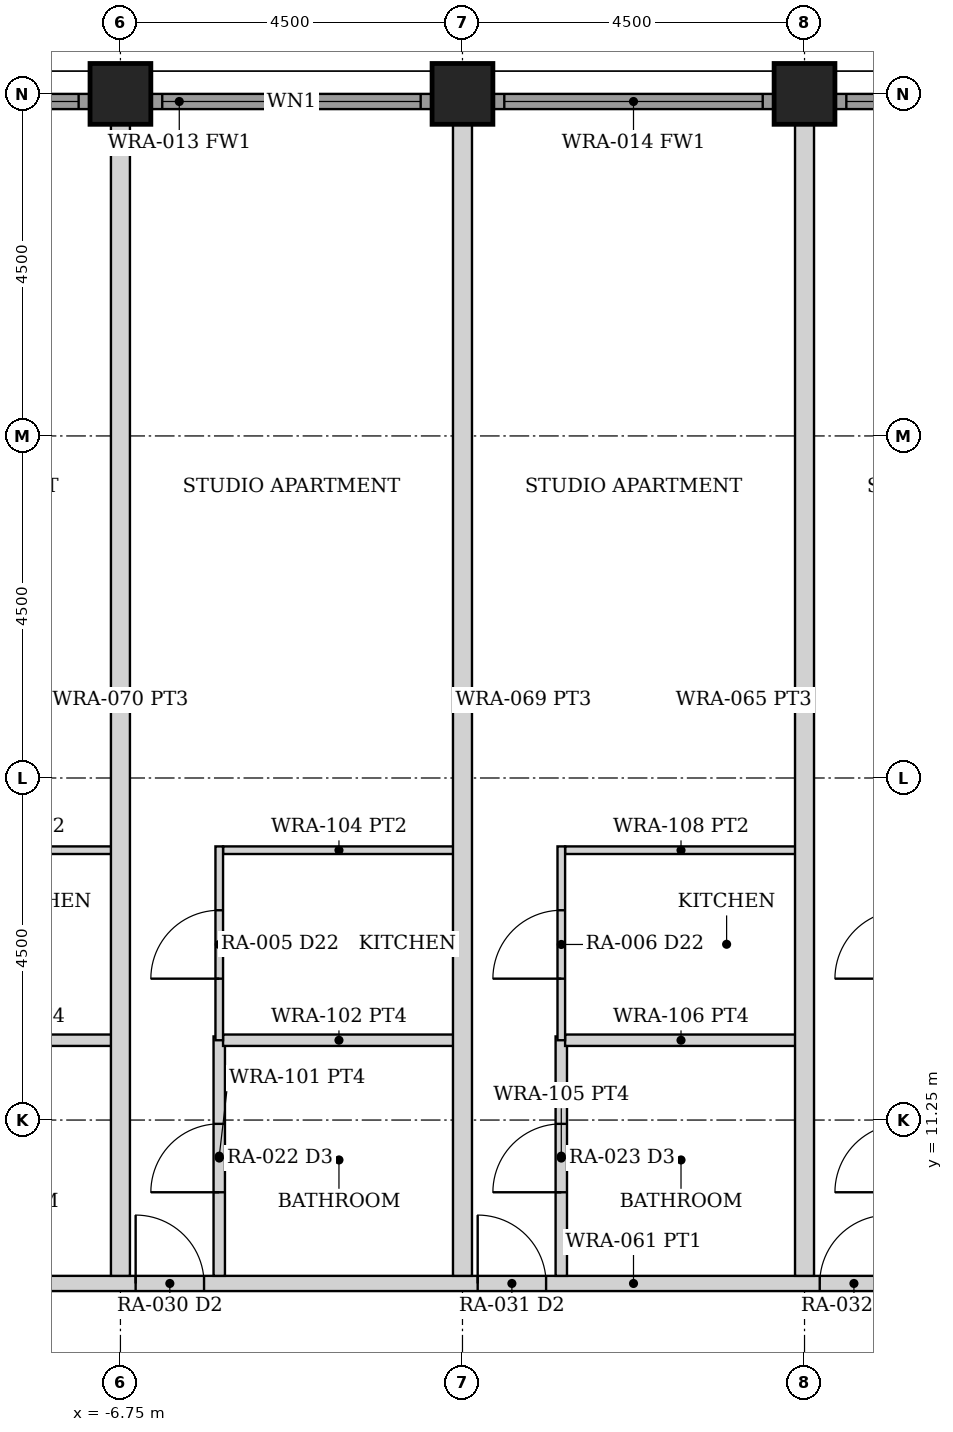
"""IFC4 building model, lengths in metres.
Left out: names, types, materials, properties, quantities, classifications, styles, units other than length and angle.
Written with IfcOpenShell. Run it as: python <this file> out.ifc"""

import sys

from ifc_helpers import new_model, si_unit, direction, frame, frame_2d, origin, origin_2d, place, context, subcontext, project, spatial, rectangle, hollow_rectangle, extrude, element, fill, save


model = new_model("IFC4")
c1 = context("Model", 3, precision=1e-05, world=origin(), true_north=direction((0.0, 1.0)))
c2 = subcontext(c1, "Body", "Model", "MODEL_VIEW")
j1 = project(units=[si_unit("LENGTHUNIT", "METRE"), si_unit("PLANEANGLEUNIT", "RADIAN")], contexts=[c1])
p1 = place(None, origin())
s1 = spatial("IfcSite", under=j1, at=p1, CompositionType="ELEMENT")
p2 = place(p1, origin())
s2 = spatial("IfcBuilding", under=s1, at=p2, CompositionType="ELEMENT")
p3 = place(p2, frame((0.0, 0.0, 26.5)))
s3 = spatial("IfcBuildingStorey", under=s2, at=p3, CompositionType="ELEMENT", Elevation=26.5)
for number, where, z_axis, x_axis in (
    (1, (-6.75, 24.75, 0.0), (0.0, 0.0, 1.0), (0.0, 1.0, 0.0)),
    (2, (-2.25, 24.75, 0.0), (0.0, 0.0, 1.0), (0.0, 1.0, 0.0)),
    (3, (2.25, 24.75, 0.0), (0.0, 0.0, 1.0), (0.0, 1.0, 0.0)),
):
    element("IfcColumn", number, at=place(p3, frame(where, z_axis=z_axis, x_axis=x_axis)), inside=s3, PredefinedType="COLUMN", context=c2, shape_type="SweptSolid", body=[
        extrude(hollow_rectangle(XDim=0.8, YDim=0.8, WallThickness=0.08, at=origin_2d()), origin(), (0.0, 0.0, 1.0), 3.5),
    ])
p4 = place(p3, frame((-10.845, 24.65, 0.0), z_axis=(0.0, 0.0, 1.0), x_axis=(1.0, 0.0, 0.0)))
e4 = element("IfcWall", 4, at=p4, inside=s3, PredefinedType="SOLIDWALL", context=c2, shape_type="SweptSolid", body=[
    extrude(rectangle(XDim=3.69, YDim=0.2, at=frame_2d((1.845, 0.0))), origin(), (0.0, 0.0, 1.0), 2.379),
])
p5 = place(p4, frame((0.145, 0.0, 0.3)))
e5 = element("IfcOpeningElement", 5, at=p5, cuts=e4, PredefinedType="OPENING", context=c2, shape_type="SweptSolid", body=[
    extrude(rectangle(XDim=3.4, YDim=1.929, at=frame_2d((1.7, 0.964))), frame((0.0, 0.11, 0.0), z_axis=(0.0, -1.0, 0.0), x_axis=(1.0, 0.0, 0.0)), (0.0, 0.0, 1.0), 0.22),
])
p6 = place(p3, frame((-6.345, 24.65, 0.0), z_axis=(0.0, 0.0, 1.0), x_axis=(1.0, 0.0, 0.0)))
e6 = element("IfcWall", 6, at=p6, inside=s3, PredefinedType="SOLIDWALL", context=c2, shape_type="SweptSolid", body=[
    extrude(rectangle(XDim=3.69, YDim=0.2, at=frame_2d((1.845, 0.0))), origin(), (0.0, 0.0, 1.0), 2.379),
])
p7 = place(p6, frame((0.145, 0.0, 0.3)))
e7 = element("IfcOpeningElement", 7, at=p7, cuts=e6, PredefinedType="OPENING", context=c2, shape_type="SweptSolid", body=[
    extrude(rectangle(XDim=3.4, YDim=1.929, at=frame_2d((1.7, 0.964))), frame((0.0, 0.11, 0.0), z_axis=(0.0, -1.0, 0.0), x_axis=(1.0, 0.0, 0.0)), (0.0, 0.0, 1.0), 0.22),
])
p8 = place(p3, frame((-1.845, 24.65, 0.0), z_axis=(0.0, 0.0, 1.0), x_axis=(1.0, 0.0, 0.0)))
e8 = element("IfcWall", 8, at=p8, inside=s3, PredefinedType="SOLIDWALL", context=c2, shape_type="SweptSolid", body=[
    extrude(rectangle(XDim=3.69, YDim=0.2, at=frame_2d((1.845, 0.0))), origin(), (0.0, 0.0, 1.0), 2.379),
])
p9 = place(p8, frame((0.145, 0.0, 0.3)))
e9 = element("IfcOpeningElement", 9, at=p9, cuts=e8, PredefinedType="OPENING", context=c2, shape_type="SweptSolid", body=[
    extrude(rectangle(XDim=3.4, YDim=1.929, at=frame_2d((1.7, 0.964))), frame((0.0, 0.11, 0.0), z_axis=(0.0, -1.0, 0.0), x_axis=(1.0, 0.0, 0.0)), (0.0, 0.0, 1.0), 0.22),
])
p10 = place(p3, frame((2.655, 24.65, 0.0), z_axis=(0.0, 0.0, 1.0), x_axis=(1.0, 0.0, 0.0)))
e10 = element("IfcWall", 10, at=p10, inside=s3, PredefinedType="SOLIDWALL", context=c2, shape_type="SweptSolid", body=[
    extrude(rectangle(XDim=3.69, YDim=0.2, at=frame_2d((1.845, 0.0))), origin(), (0.0, 0.0, 1.0), 2.379),
])
p11 = place(p10, frame((0.145, 0.0, 0.3)))
e11 = element("IfcOpeningElement", 11, at=p11, cuts=e10, PredefinedType="OPENING", context=c2, shape_type="SweptSolid", body=[
    extrude(rectangle(XDim=3.4, YDim=1.929, at=frame_2d((1.7, 0.964))), frame((0.0, 0.11, 0.0), z_axis=(0.0, -1.0, 0.0), x_axis=(1.0, 0.0, 0.0)), (0.0, 0.0, 1.0), 0.22),
])
p12 = place(p3, frame((-24.55, 9.1, 0.0), z_axis=(0.0, 0.0, 1.0), x_axis=(1.0, 0.0, 0.0)))
e12 = element("IfcWall", 12, at=p12, inside=s3, PredefinedType="PARTITIONING", context=c2, shape_type="SweptSolid", body=[
    extrude(rectangle(XDim=49.1, YDim=0.2, at=frame_2d((24.55, 0.0))), origin(), (0.0, 0.0, 1.0), 2.373),
])
p13 = place(p12, frame((5.1, 0.0, 0.0)))
e13 = element("IfcOpeningElement", 13, at=p13, cuts=e12, PredefinedType="OPENING", context=c2, shape_type="SweptSolid", body=[
    extrude(rectangle(XDim=0.9, YDim=2.1, at=frame_2d((0.45, 1.05))), frame((0.0, 0.11, 0.0), z_axis=(0.0, -1.0, 0.0), x_axis=(1.0, 0.0, 0.0)), (0.0, 0.0, 1.0), 0.22),
])
p14 = place(p12, frame((9.0, 0.0, 0.0)))
e14 = element("IfcOpeningElement", 14, at=p14, cuts=e12, PredefinedType="OPENING", context=c2, shape_type="SweptSolid", body=[
    extrude(rectangle(XDim=0.9, YDim=2.1, at=frame_2d((0.45, 1.05))), frame((0.0, 0.11, 0.0), z_axis=(0.0, -1.0, 0.0), x_axis=(1.0, 0.0, 0.0)), (0.0, 0.0, 1.0), 0.22),
])
p15 = place(p12, frame((13.5, 0.0, 0.0)))
e15 = element("IfcOpeningElement", 15, at=p15, cuts=e12, PredefinedType="OPENING", context=c2, shape_type="SweptSolid", body=[
    extrude(rectangle(XDim=0.9, YDim=2.1, at=frame_2d((0.45, 1.05))), frame((0.0, 0.11, 0.0), z_axis=(0.0, -1.0, 0.0), x_axis=(1.0, 0.0, 0.0)), (0.0, 0.0, 1.0), 0.22),
])
p16 = place(p12, frame((18.0, 0.0, 0.0)))
e16 = element("IfcOpeningElement", 16, at=p16, cuts=e12, PredefinedType="OPENING", context=c2, shape_type="SweptSolid", body=[
    extrude(rectangle(XDim=0.9, YDim=2.1, at=frame_2d((0.45, 1.05))), frame((0.0, 0.11, 0.0), z_axis=(0.0, -1.0, 0.0), x_axis=(1.0, 0.0, 0.0)), (0.0, 0.0, 1.0), 0.22),
])
p17 = place(p12, frame((22.5, 0.0, 0.0)))
e17 = element("IfcOpeningElement", 17, at=p17, cuts=e12, PredefinedType="OPENING", context=c2, shape_type="SweptSolid", body=[
    extrude(rectangle(XDim=0.9, YDim=2.1, at=frame_2d((0.45, 1.05))), frame((0.0, 0.11, 0.0), z_axis=(0.0, -1.0, 0.0), x_axis=(1.0, 0.0, 0.0)), (0.0, 0.0, 1.0), 0.22),
])
p18 = place(p12, frame((27.0, 0.0, 0.0)))
e18 = element("IfcOpeningElement", 18, at=p18, cuts=e12, PredefinedType="OPENING", context=c2, shape_type="SweptSolid", body=[
    extrude(rectangle(XDim=0.9, YDim=2.1, at=frame_2d((0.45, 1.05))), frame((0.0, 0.11, 0.0), z_axis=(0.0, -1.0, 0.0), x_axis=(1.0, 0.0, 0.0)), (0.0, 0.0, 1.0), 0.22),
])
p19 = place(p12, frame((31.5, 0.0, 0.0)))
e19 = element("IfcOpeningElement", 19, at=p19, cuts=e12, PredefinedType="OPENING", context=c2, shape_type="SweptSolid", body=[
    extrude(rectangle(XDim=0.9, YDim=2.1, at=frame_2d((0.45, 1.05))), frame((0.0, 0.11, 0.0), z_axis=(0.0, -1.0, 0.0), x_axis=(1.0, 0.0, 0.0)), (0.0, 0.0, 1.0), 0.22),
])
p20 = place(p12, frame((36.0, 0.0, 0.0)))
e20 = element("IfcOpeningElement", 20, at=p20, cuts=e12, PredefinedType="OPENING", context=c2, shape_type="SweptSolid", body=[
    extrude(rectangle(XDim=0.9, YDim=2.1, at=frame_2d((0.45, 1.05))), frame((0.0, 0.11, 0.0), z_axis=(0.0, -1.0, 0.0), x_axis=(1.0, 0.0, 0.0)), (0.0, 0.0, 1.0), 0.22),
])
p21 = place(p12, frame((43.1, 0.0, 0.0)))
e21 = element("IfcOpeningElement", 21, at=p21, cuts=e12, PredefinedType="OPENING", context=c2, shape_type="SweptSolid", body=[
    extrude(rectangle(XDim=0.9, YDim=2.1, at=frame_2d((0.45, 1.05))), frame((0.0, 0.11, 0.0), z_axis=(0.0, -1.0, 0.0), x_axis=(1.0, 0.0, 0.0)), (0.0, 0.0, 1.0), 0.22),
])
p22 = place(p3, frame((-9.9, 12.3, 0.0), z_axis=(0.0, 0.0, 1.0), x_axis=(1.0, 0.0, 0.0)))
e22 = element("IfcWall", 22, at=p22, inside=s3, PredefinedType="PARTITIONING", context=c2, shape_type="SweptSolid", body=[
    extrude(rectangle(XDim=3.05, YDim=0.15, at=frame_2d((1.525, 0.0))), origin(), (0.0, 0.0, 1.0), 2.373),
])
p23 = place(p3, frame((-9.9, 14.8, 0.0), z_axis=(0.0, 0.0, 1.0), x_axis=(1.0, 0.0, 0.0)))
e23 = element("IfcWall", 23, at=p23, inside=s3, PredefinedType="PARTITIONING", context=c2, shape_type="SweptSolid", body=[
    extrude(rectangle(XDim=3.05, YDim=0.1, at=frame_2d((1.525, 0.0))), origin(), (0.0, 0.0, 1.0), 2.373),
])
p24 = place(p3, frame((-5.45, 9.2, 0.0), z_axis=(0.0, 0.0, 1.0), x_axis=(0.0, 1.0, 0.0)))
e24 = element("IfcWall", 24, at=p24, inside=s3, PredefinedType="PARTITIONING", context=c2, shape_type="SweptSolid", body=[
    extrude(rectangle(XDim=3.15, YDim=0.15, at=frame_2d((1.575, 0.0))), origin(), (0.0, 0.0, 1.0), 2.373),
])
p25 = place(p24, frame((1.1, 0.0, 0.0)))
e25 = element("IfcOpeningElement", 25, at=p25, cuts=e24, PredefinedType="OPENING", context=c2, shape_type="SweptSolid", body=[
    extrude(rectangle(XDim=0.9, YDim=2.1, at=frame_2d((0.45, 1.05))), frame((0.0, 0.085, 0.0), z_axis=(0.0, -1.0, 0.0), x_axis=(1.0, 0.0, 0.0)), (0.0, 0.0, 1.0), 0.17),
])
p26 = place(p3, frame((-5.4, 12.3, 0.0), z_axis=(0.0, 0.0, 1.0), x_axis=(1.0, 0.0, 0.0)))
e26 = element("IfcWall", 26, at=p26, inside=s3, PredefinedType="PARTITIONING", context=c2, shape_type="SweptSolid", body=[
    extrude(rectangle(XDim=3.05, YDim=0.15, at=frame_2d((1.525, 0.0))), origin(), (0.0, 0.0, 1.0), 2.373),
])
p27 = place(p3, frame((-5.4, 14.8, 0.0), z_axis=(0.0, 0.0, 1.0), x_axis=(1.0, 0.0, 0.0)))
e27 = element("IfcWall", 27, at=p27, inside=s3, PredefinedType="PARTITIONING", context=c2, shape_type="SweptSolid", body=[
    extrude(rectangle(XDim=3.05, YDim=0.1, at=frame_2d((1.525, 0.0))), origin(), (0.0, 0.0, 1.0), 2.373),
])
p28 = place(p3, frame((-5.45, 12.3, 0.0), z_axis=(0.0, 0.0, 1.0), x_axis=(0.0, 1.0, 0.0)))
e28 = element("IfcWall", 28, at=p28, inside=s3, PredefinedType="PARTITIONING", context=c2, shape_type="SweptSolid", body=[
    extrude(rectangle(XDim=2.55, YDim=0.1, at=frame_2d((1.275, 0.0))), origin(), (0.0, 0.0, 1.0), 2.373),
])
p29 = place(p28, frame((0.81, 0.0, 0.0)))
e29 = element("IfcOpeningElement", 29, at=p29, cuts=e28, PredefinedType="OPENING", context=c2, shape_type="SweptSolid", body=[
    extrude(rectangle(XDim=0.9, YDim=2.1, at=frame_2d((0.45, 1.05))), frame((0.0, 0.06, 0.0), z_axis=(0.0, -1.0, 0.0), x_axis=(1.0, 0.0, 0.0)), (0.0, 0.0, 1.0), 0.12),
])
p30 = place(p3, frame((-0.95, 9.2, 0.0), z_axis=(0.0, 0.0, 1.0), x_axis=(0.0, 1.0, 0.0)))
e30 = element("IfcWall", 30, at=p30, inside=s3, PredefinedType="PARTITIONING", context=c2, shape_type="SweptSolid", body=[
    extrude(rectangle(XDim=3.15, YDim=0.15, at=frame_2d((1.575, 0.0))), origin(), (0.0, 0.0, 1.0), 2.373),
])
p31 = place(p30, frame((1.1, 0.0, 0.0)))
e31 = element("IfcOpeningElement", 31, at=p31, cuts=e30, PredefinedType="OPENING", context=c2, shape_type="SweptSolid", body=[
    extrude(rectangle(XDim=0.9, YDim=2.1, at=frame_2d((0.45, 1.05))), frame((0.0, 0.085, 0.0), z_axis=(0.0, -1.0, 0.0), x_axis=(1.0, 0.0, 0.0)), (0.0, 0.0, 1.0), 0.17),
])
p32 = place(p3, frame((-0.9, 12.3, 0.0), z_axis=(0.0, 0.0, 1.0), x_axis=(1.0, 0.0, 0.0)))
e32 = element("IfcWall", 32, at=p32, inside=s3, PredefinedType="PARTITIONING", context=c2, shape_type="SweptSolid", body=[
    extrude(rectangle(XDim=3.05, YDim=0.15, at=frame_2d((1.525, 0.0))), origin(), (0.0, 0.0, 1.0), 2.373),
])
p33 = place(p3, frame((-0.9, 14.8, 0.0), z_axis=(0.0, 0.0, 1.0), x_axis=(1.0, 0.0, 0.0)))
e33 = element("IfcWall", 33, at=p33, inside=s3, PredefinedType="PARTITIONING", context=c2, shape_type="SweptSolid", body=[
    extrude(rectangle(XDim=3.05, YDim=0.1, at=frame_2d((1.525, 0.0))), origin(), (0.0, 0.0, 1.0), 2.373),
])
p34 = place(p3, frame((-0.95, 12.3, 0.0), z_axis=(0.0, 0.0, 1.0), x_axis=(0.0, 1.0, 0.0)))
e34 = element("IfcWall", 34, at=p34, inside=s3, PredefinedType="PARTITIONING", context=c2, shape_type="SweptSolid", body=[
    extrude(rectangle(XDim=2.55, YDim=0.1, at=frame_2d((1.275, 0.0))), origin(), (0.0, 0.0, 1.0), 2.373),
])
p35 = place(p34, frame((0.81, 0.0, 0.0)))
e35 = element("IfcOpeningElement", 35, at=p35, cuts=e34, PredefinedType="OPENING", context=c2, shape_type="SweptSolid", body=[
    extrude(rectangle(XDim=0.9, YDim=2.1, at=frame_2d((0.45, 1.05))), frame((0.0, 0.06, 0.0), z_axis=(0.0, -1.0, 0.0), x_axis=(1.0, 0.0, 0.0)), (0.0, 0.0, 1.0), 0.12),
])
for number, where, z_axis, x_axis in (
    (36, (-6.75, 9.2, 0.0), (0.0, 0.0, 1.0), (0.0, 1.0, 0.0)),
    (37, (-2.25, 9.2, 0.0), (0.0, 0.0, 1.0), (0.0, 1.0, 0.0)),
    (38, (2.25, 9.2, 0.0), (0.0, 0.0, 1.0), (0.0, 1.0, 0.0)),
):
    element("IfcWall", number, at=place(p3, frame(where, z_axis=z_axis, x_axis=x_axis)), inside=s3, PredefinedType="PARTITIONING", context=c2, shape_type="SweptSolid", body=[
        extrude(rectangle(XDim=15.15, YDim=0.25, at=frame_2d((7.575, 0.0))), origin(), (0.0, 0.0, 1.0), 2.373),
    ])
p36 = place(p5, origin())
e39 = element("IfcWindow", 39, at=p36, inside=s3, PartitioningType="SINGLE_PANEL", PredefinedType="WINDOW", context=c2, shape_type="SweptSolid", body=[
    extrude(rectangle(XDim=3.4, YDim=1.929, at=frame_2d((1.7, 0.964))), frame((0.0, 0.03, 0.0), z_axis=(0.0, -1.0, 0.0), x_axis=(1.0, 0.0, 0.0)), (0.0, 0.0, 1.0), 0.06),
])
fill(e5, e39)
p37 = place(p7, origin())
e40 = element("IfcWindow", 40, at=p37, inside=s3, PartitioningType="SINGLE_PANEL", PredefinedType="WINDOW", context=c2, shape_type="SweptSolid", body=[
    extrude(rectangle(XDim=3.4, YDim=1.929, at=frame_2d((1.7, 0.964))), frame((0.0, 0.03, 0.0), z_axis=(0.0, -1.0, 0.0), x_axis=(1.0, 0.0, 0.0)), (0.0, 0.0, 1.0), 0.06),
])
fill(e7, e40)
p38 = place(p9, origin())
e41 = element("IfcWindow", 41, at=p38, inside=s3, PartitioningType="SINGLE_PANEL", PredefinedType="WINDOW", context=c2, shape_type="SweptSolid", body=[
    extrude(rectangle(XDim=3.4, YDim=1.929, at=frame_2d((1.7, 0.964))), frame((0.0, 0.03, 0.0), z_axis=(0.0, -1.0, 0.0), x_axis=(1.0, 0.0, 0.0)), (0.0, 0.0, 1.0), 0.06),
])
fill(e9, e41)
p39 = place(p11, origin())
e42 = element("IfcWindow", 42, at=p39, inside=s3, PartitioningType="SINGLE_PANEL", PredefinedType="WINDOW", context=c2, shape_type="SweptSolid", body=[
    extrude(rectangle(XDim=3.4, YDim=1.929, at=frame_2d((1.7, 0.964))), frame((0.0, 0.03, 0.0), z_axis=(0.0, -1.0, 0.0), x_axis=(1.0, 0.0, 0.0)), (0.0, 0.0, 1.0), 0.06),
])
fill(e11, e42)
p40 = place(p16, origin())
e43 = element("IfcDoor", 43, at=p40, inside=s3, OperationType="SINGLE_SWING_LEFT", PredefinedType="DOOR", context=c2, shape_type="SweptSolid", body=[
    extrude(rectangle(XDim=0.9, YDim=2.1, at=frame_2d((0.45, 1.05))), frame((0.0, 0.025, 0.0), z_axis=(0.0, -1.0, 0.0), x_axis=(1.0, 0.0, 0.0)), (0.0, 0.0, 1.0), 0.05),
])
fill(e16, e43)
p41 = place(p25, origin())
e44 = element("IfcDoor", 44, at=p41, inside=s3, OperationType="SINGLE_SWING_LEFT", PredefinedType="DOOR", context=c2, shape_type="SweptSolid", body=[
    extrude(rectangle(XDim=0.9, YDim=2.1, at=frame_2d((0.45, 1.05))), frame((0.0, 0.025, 0.0), z_axis=(0.0, -1.0, 0.0), x_axis=(1.0, 0.0, 0.0)), (0.0, 0.0, 1.0), 0.05),
])
fill(e25, e44)
p42 = place(p29, origin())
e45 = element("IfcDoor", 45, at=p42, inside=s3, OperationType="SINGLE_SWING_LEFT", PredefinedType="DOOR", context=c2, shape_type="SweptSolid", body=[
    extrude(rectangle(XDim=0.9, YDim=2.1, at=frame_2d((0.45, 1.05))), frame((0.0, 0.025, 0.0), z_axis=(0.0, -1.0, 0.0), x_axis=(1.0, 0.0, 0.0)), (0.0, 0.0, 1.0), 0.05),
])
fill(e29, e45)
p43 = place(p17, origin())
e46 = element("IfcDoor", 46, at=p43, inside=s3, OperationType="SINGLE_SWING_LEFT", PredefinedType="DOOR", context=c2, shape_type="SweptSolid", body=[
    extrude(rectangle(XDim=0.9, YDim=2.1, at=frame_2d((0.45, 1.05))), frame((0.0, 0.025, 0.0), z_axis=(0.0, -1.0, 0.0), x_axis=(1.0, 0.0, 0.0)), (0.0, 0.0, 1.0), 0.05),
])
fill(e17, e46)
p44 = place(p31, origin())
e47 = element("IfcDoor", 47, at=p44, inside=s3, OperationType="SINGLE_SWING_LEFT", PredefinedType="DOOR", context=c2, shape_type="SweptSolid", body=[
    extrude(rectangle(XDim=0.9, YDim=2.1, at=frame_2d((0.45, 1.05))), frame((0.0, 0.025, 0.0), z_axis=(0.0, -1.0, 0.0), x_axis=(1.0, 0.0, 0.0)), (0.0, 0.0, 1.0), 0.05),
])
fill(e31, e47)
p45 = place(p35, origin())
e48 = element("IfcDoor", 48, at=p45, inside=s3, OperationType="SINGLE_SWING_LEFT", PredefinedType="DOOR", context=c2, shape_type="SweptSolid", body=[
    extrude(rectangle(XDim=0.9, YDim=2.1, at=frame_2d((0.45, 1.05))), frame((0.0, 0.025, 0.0), z_axis=(0.0, -1.0, 0.0), x_axis=(1.0, 0.0, 0.0)), (0.0, 0.0, 1.0), 0.05),
])
fill(e35, e48)
p46 = place(p18, origin())
e49 = element("IfcDoor", 49, at=p46, inside=s3, OperationType="SINGLE_SWING_RIGHT", PredefinedType="DOOR", context=c2, shape_type="SweptSolid", body=[
    extrude(rectangle(XDim=0.9, YDim=2.1, at=frame_2d((0.45, 1.05))), frame((0.0, 0.025, 0.0), z_axis=(0.0, -1.0, 0.0), x_axis=(1.0, 0.0, 0.0)), (0.0, 0.0, 1.0), 0.05),
])
fill(e18, e49)
save(model, sys.argv[1])
